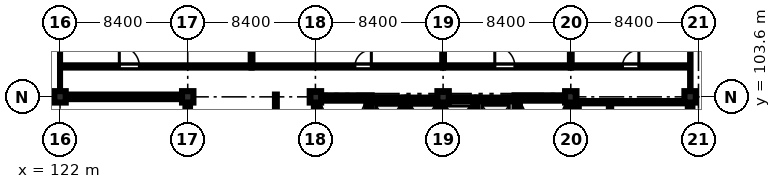
"""IFC4 building model, lengths in metres.
Left out: names, types, materials, properties, quantities, classifications, styles, units other than length and angle.
Written with IfcOpenShell. Run it as: python <this file> out.ifc"""

import sys

from ifc_helpers import new_model, si_unit, direction, frame, frame_2d, origin, origin_2d, place, context, subcontext, project, spatial, rectangle, extrude, element, fill, save


model = new_model("IFC4")
c1 = context("Model", 3, precision=1e-05, world=origin(), true_north=direction((0.0, 1.0)))
c2 = subcontext(c1, "Body", "Model", "MODEL_VIEW")
j1 = project(units=[si_unit("LENGTHUNIT", "METRE"), si_unit("PLANEANGLEUNIT", "RADIAN")], contexts=[c1])
p1 = place(None, origin())
s1 = spatial("IfcSite", under=j1, at=p1, CompositionType="ELEMENT")
p2 = place(p1, origin())
s2 = spatial("IfcBuilding", under=s1, at=p2, CompositionType="ELEMENT")
p3 = place(p2, frame((0.0, 0.0, 52.8)))
s3 = spatial("IfcBuildingStorey", under=s2, at=p3, CompositionType="ELEMENT", Elevation=52.8)
for number, where, z_axis, x_axis in (
    (1, (122.0, 103.6, 0.0), (0.0, 0.0, 1.0), (1.0, 0.0, 0.0)),
    (2, (130.4, 103.6, 0.0), (0.0, 0.0, 1.0), (1.0, 0.0, 0.0)),
    (3, (138.8, 103.6, 0.0), (0.0, 0.0, 1.0), (1.0, 0.0, 0.0)),
    (4, (147.2, 103.6, 0.0), (0.0, 0.0, 1.0), (1.0, 0.0, 0.0)),
    (5, (155.6, 103.6, 0.0), (0.0, 0.0, 1.0), (1.0, 0.0, 0.0)),
    (6, (163.45, 103.6, 0.0), (0.0, 0.0, 1.0), (1.0, 0.0, 0.0)),
):
    element("IfcColumn", number, at=place(p3, frame(where, z_axis=z_axis, x_axis=x_axis)), inside=s3, PredefinedType="COLUMN", context=c2, shape_type="SweptSolid", body=[
        extrude(rectangle(XDim=0.75, YDim=0.75, at=origin_2d()), origin(), (0.0, 0.0, 1.0), 4.03),
    ])
p4 = place(p3, frame((138.7, 103.525, 0.0), z_axis=(0.0, 0.0, 1.0), x_axis=(1.0, 0.0, 0.0)))
e7 = element("IfcWall", 7, at=p4, inside=s3, PredefinedType="SHEAR", context=c2, shape_type="SweptSolid", body=[
    extrude(rectangle(XDim=3.8, YDim=0.35, at=frame_2d((1.9, 0.0))), origin(), (0.0, 0.0, 1.0), 4.03),
])
p5 = place(p3, frame((138.875, 95.45, 0.0), z_axis=(0.0, 0.0, 1.0), x_axis=(0.0, 1.0, 0.0)))
e8 = element("IfcWall", 8, at=p5, inside=s3, PredefinedType="SHEAR", context=c2, shape_type="SweptSolid", body=[
    extrude(rectangle(XDim=7.9, YDim=0.35, at=frame_2d((3.95, 0.0))), origin(), (0.0, 0.0, 1.0), 4.03),
])
p6 = place(p3, frame((142.325, 95.45, 0.0), z_axis=(0.0, 0.0, 1.0), x_axis=(0.0, 1.0, 0.0)))
e9 = element("IfcWall", 9, at=p6, inside=s3, PredefinedType="SHEAR", context=c2, shape_type="SweptSolid", body=[
    extrude(rectangle(XDim=7.9, YDim=0.35, at=frame_2d((3.95, 0.0))), origin(), (0.0, 0.0, 1.0), 4.03),
])
p7 = place(p6, frame((0.22, 0.0, 0.0)))
e10 = element("IfcOpeningElement", 10, at=p7, cuts=e9, PredefinedType="OPENING", context=c2, shape_type="SweptSolid", body=[
    extrude(rectangle(XDim=1.15, YDim=2.15, at=frame_2d((0.575, 1.075))), frame((0.0, 0.185, 0.0), z_axis=(0.0, -1.0, 0.0), x_axis=(1.0, 0.0, 0.0)), (0.0, 0.0, 1.0), 0.37),
])
p8 = place(p3, frame((151.9, 103.525, 0.0), z_axis=(0.0, 0.0, 1.0), x_axis=(1.0, 0.0, 0.0)))
e11 = element("IfcWall", 11, at=p8, inside=s3, PredefinedType="SHEAR", context=c2, shape_type="SweptSolid", body=[
    extrude(rectangle(XDim=3.8, YDim=0.35, at=frame_2d((1.9, 0.0))), origin(), (0.0, 0.0, 1.0), 4.03),
])
p9 = place(p3, frame((152.075, 95.45, 0.0), z_axis=(0.0, 0.0, 1.0), x_axis=(0.0, 1.0, 0.0)))
e12 = element("IfcWall", 12, at=p9, inside=s3, PredefinedType="SHEAR", context=c2, shape_type="SweptSolid", body=[
    extrude(rectangle(XDim=7.9, YDim=0.35, at=frame_2d((3.95, 0.0))), origin(), (0.0, 0.0, 1.0), 4.03),
])
p10 = place(p9, frame((0.35, 0.0, 0.0)))
e13 = element("IfcOpeningElement", 13, at=p10, cuts=e12, PredefinedType="OPENING", context=c2, shape_type="SweptSolid", body=[
    extrude(rectangle(XDim=1.15, YDim=2.15, at=frame_2d((0.575, 1.075))), frame((0.0, 0.185, 0.0), z_axis=(0.0, -1.0, 0.0), x_axis=(1.0, 0.0, 0.0)), (0.0, 0.0, 1.0), 0.37),
])
p11 = place(p3, frame((155.525, 95.45, 0.0), z_axis=(0.0, 0.0, 1.0), x_axis=(0.0, 1.0, 0.0)))
e14 = element("IfcWall", 14, at=p11, inside=s3, PredefinedType="SHEAR", context=c2, shape_type="SweptSolid", body=[
    extrude(rectangle(XDim=7.9, YDim=0.35, at=frame_2d((3.95, 0.0))), origin(), (0.0, 0.0, 1.0), 4.03),
])
p12 = place(p3, frame((142.5, 103.425, 0.0), z_axis=(0.0, 0.0, 1.0), x_axis=(1.0, 0.0, 0.0)))
e15 = element("IfcWall", 15, at=p12, inside=s3, PredefinedType="SHEAR", context=c2, shape_type="SweptSolid", body=[
    extrude(rectangle(XDim=2.1, YDim=0.25, at=frame_2d((1.05, 0.0))), origin(), (0.0, 0.0, 1.0), 4.03),
])
p13 = place(p3, frame((144.725, 100.15, 0.0), z_axis=(0.0, 0.0, 1.0), x_axis=(0.0, 1.0, 0.0)))
e16 = element("IfcWall", 16, at=p13, inside=s3, PredefinedType="SHEAR", context=c2, shape_type="SweptSolid", body=[
    extrude(rectangle(XDim=3.4, YDim=0.25, at=frame_2d((1.7, 0.0))), origin(), (0.0, 0.0, 1.0), 4.03),
])
p14 = place(p3, frame((144.85, 103.425, 0.0), z_axis=(0.0, 0.0, 1.0), x_axis=(1.0, 0.0, 0.0)))
e17 = element("IfcWall", 17, at=p14, inside=s3, PredefinedType="SHEAR", context=c2, shape_type="SweptSolid", body=[
    extrude(rectangle(XDim=2.05, YDim=0.25, at=frame_2d((1.025, 0.0))), origin(), (0.0, 0.0, 1.0), 4.03),
])
p15 = place(p3, frame((147.025, 100.15, 0.0), z_axis=(0.0, 0.0, 1.0), x_axis=(0.0, 1.0, 0.0)))
e18 = element("IfcWall", 18, at=p15, inside=s3, PredefinedType="SHEAR", context=c2, shape_type="SweptSolid", body=[
    extrude(rectangle(XDim=3.4, YDim=0.25, at=frame_2d((1.7, 0.0))), origin(), (0.0, 0.0, 1.0), 4.03),
])
p16 = place(p3, frame((147.15, 103.425, 0.0), z_axis=(0.0, 0.0, 1.0), x_axis=(1.0, 0.0, 0.0)))
e19 = element("IfcWall", 19, at=p16, inside=s3, PredefinedType="SHEAR", context=c2, shape_type="SweptSolid", body=[
    extrude(rectangle(XDim=2.05, YDim=0.25, at=frame_2d((1.025, 0.0))), origin(), (0.0, 0.0, 1.0), 4.03),
])
p17 = place(p3, frame((149.325, 100.35, 0.0), z_axis=(0.0, 0.0, 1.0), x_axis=(0.0, 1.0, 0.0)))
e20 = element("IfcWall", 20, at=p17, inside=s3, PredefinedType="SHEAR", context=c2, shape_type="SweptSolid", body=[
    extrude(rectangle(XDim=3.2, YDim=0.25, at=frame_2d((1.6, 0.0))), origin(), (0.0, 0.0, 1.0), 4.03),
])
p18 = place(p3, frame((149.45, 103.425, 0.0), z_axis=(0.0, 0.0, 1.0), x_axis=(1.0, 0.0, 0.0)))
e21 = element("IfcWall", 21, at=p18, inside=s3, PredefinedType="SHEAR", context=c2, shape_type="SweptSolid", body=[
    extrude(rectangle(XDim=2.45, YDim=0.25, at=frame_2d((1.225, 0.0))), origin(), (0.0, 0.0, 1.0), 4.03),
])
p19 = place(p3, frame((163.45, 103.225, 0.0), z_axis=(0.0, 0.0, 1.0), x_axis=(0.0, -1.0, 0.0)))
e22 = element("IfcWall", 22, at=p19, inside=s3, PredefinedType="STANDARD", context=c2, shape_type="SweptSolid", body=[
    extrude(rectangle(XDim=7.65, YDim=0.3, at=frame_2d((3.825, 0.0))), origin(), (0.0, 0.0, 1.0), 3.33),
])
p20 = place(p19, frame((1.15, 0.0, 1.1)))
e23 = element("IfcOpeningElement", 23, at=p20, cuts=e22, PredefinedType="OPENING", context=c2, shape_type="SweptSolid", body=[
    extrude(rectangle(XDim=1.4, YDim=1.4, at=frame_2d((0.7, 0.7))), frame((0.0, 0.16, 0.0), z_axis=(0.0, -1.0, 0.0), x_axis=(1.0, 0.0, 0.0)), (0.0, 0.0, 1.0), 0.32),
])
p21 = place(p3, frame((130.4, 95.575, 0.0), z_axis=(0.0, 0.0, 1.0), x_axis=(0.0, 1.0, 0.0)))
e24 = element("IfcWall", 24, at=p21, inside=s3, PredefinedType="STANDARD", context=c2, shape_type="SweptSolid", body=[
    extrude(rectangle(XDim=7.65, YDim=0.3, at=frame_2d((3.825, 0.0))), origin(), (0.0, 0.0, 1.0), 3.33),
])
p22 = place(p21, frame((2.4, 0.0, 1.0)))
e25 = element("IfcOpeningElement", 25, at=p22, cuts=e24, PredefinedType="OPENING", context=c2, shape_type="SweptSolid", body=[
    extrude(rectangle(XDim=1.8, YDim=1.8, at=frame_2d((0.9, 0.9))), frame((0.0, 0.16, 0.0), z_axis=(0.0, -1.0, 0.0), x_axis=(1.0, 0.0, 0.0)), (0.0, 0.0, 1.0), 0.32),
])
p23 = place(p3, frame((130.025, 103.6, 0.0), z_axis=(0.0, 0.0, 1.0), x_axis=(-1.0, 0.0, 0.0)))
e26 = element("IfcWall", 26, at=p23, inside=s3, PredefinedType="STANDARD", context=c2, shape_type="SweptSolid", body=[
    extrude(rectangle(XDim=7.65, YDim=0.3, at=frame_2d((3.825, 0.0))), origin(), (0.0, 0.0, 1.0), 3.33),
])
p24 = place(p3, frame((158.18, 94.68, 0.0), z_axis=(0.0, 0.0, 1.0), x_axis=(0.0, 1.0, 0.0)))
e27 = element("IfcWall", 27, at=p24, inside=s3, PredefinedType="PARTITIONING", context=c2, shape_type="SweptSolid", body=[
    extrude(rectangle(XDim=8.57, YDim=0.15, at=frame_2d((4.285, 0.0))), origin(), (0.0, 0.0, 1.0), 4.03),
])
p25 = place(p24, frame((0.8, 0.0, 0.0)))
e28 = element("IfcOpeningElement", 28, at=p25, cuts=e27, PredefinedType="OPENING", context=c2, shape_type="SweptSolid", body=[
    extrude(rectangle(XDim=1.0, YDim=2.12, at=frame_2d((0.5, 1.06))), frame((0.0, 0.085, 0.0), z_axis=(0.0, -1.0, 0.0), x_axis=(1.0, 0.0, 0.0)), (0.0, 0.0, 1.0), 0.17),
])
p26 = place(p24, frame((3.5, 0.0, 0.0)))
e29 = element("IfcOpeningElement", 29, at=p26, cuts=e27, PredefinedType="OPENING", context=c2, shape_type="SweptSolid", body=[
    extrude(rectangle(XDim=0.92, YDim=2.1, at=frame_2d((0.46, 1.05))), frame((0.0, 0.085, 0.0), z_axis=(0.0, -1.0, 0.0), x_axis=(1.0, 0.0, 0.0)), (0.0, 0.0, 1.0), 0.17),
])
p27 = place(p24, frame((6.4, 0.0, 0.0)))
e30 = element("IfcOpeningElement", 30, at=p27, cuts=e27, PredefinedType="OPENING", context=c2, shape_type="SweptSolid", body=[
    extrude(rectangle(XDim=0.92, YDim=2.1, at=frame_2d((0.46, 1.05))), frame((0.0, 0.085, 0.0), z_axis=(0.0, -1.0, 0.0), x_axis=(1.0, 0.0, 0.0)), (0.0, 0.0, 1.0), 0.17),
])
p28 = place(p3, frame((156.05, 103.25, 0.0), z_axis=(0.0, 0.0, 1.0), x_axis=(1.0, 0.0, 0.0)))
e31 = element("IfcWall", 31, at=p28, inside=s3, PredefinedType="PARTITIONING", context=c2, shape_type="SweptSolid", body=[
    extrude(rectangle(XDim=7.15, YDim=0.15, at=frame_2d((3.575, 0.0))), origin(), (0.0, 0.0, 1.0), 4.03),
])
p29 = place(p3, frame((156.05, 94.68, 0.0), z_axis=(0.0, 0.0, 1.0), x_axis=(0.0, 1.0, 0.0)))
e32 = element("IfcWall", 32, at=p29, inside=s3, PredefinedType="PARTITIONING", context=c2, shape_type="SweptSolid", body=[
    extrude(rectangle(XDim=8.57, YDim=0.15, at=frame_2d((4.285, 0.0))), origin(), (0.0, 0.0, 1.0), 4.03),
])
p30 = place(p3, frame((136.2, 94.68, 0.0), z_axis=(0.0, 0.0, 1.0), x_axis=(0.0, 1.0, 0.0)))
e33 = element("IfcWall", 33, at=p30, inside=s3, PredefinedType="PARTITIONING", context=c2, shape_type="SweptSolid", body=[
    extrude(rectangle(XDim=9.07, YDim=0.12, at=frame_2d((4.535, 0.0))), origin(), (0.0, 0.0, 1.0), 4.03),
])
p31 = place(p3, frame((122.15, 105.6, 0.0), z_axis=(0.0, 0.0, 1.0), x_axis=(1.0, 0.0, 0.0)))
e34 = element("IfcWall", 34, at=p31, inside=s3, PredefinedType="PARTITIONING", context=c2, shape_type="SweptSolid", body=[
    extrude(rectangle(XDim=12.45, YDim=0.145, at=frame_2d((6.225, 0.0))), origin(), (0.0, 0.0, 1.0), 4.03),
])
p32 = place(p31, frame((3.75, 0.0, 0.0)))
e35 = element("IfcOpeningElement", 35, at=p32, cuts=e34, PredefinedType="OPENING", context=c2, shape_type="SweptSolid", body=[
    extrude(rectangle(XDim=1.32, YDim=2.2, at=frame_2d((0.66, 1.1))), frame((0.0, 0.083, 0.0), z_axis=(0.0, -1.0, 0.0), x_axis=(1.0, 0.0, 0.0)), (0.0, 0.0, 1.0), 0.165),
])
p33 = place(p3, frame((134.6, 105.6, 0.0), z_axis=(0.0, 0.0, 1.0), x_axis=(1.0, 0.0, 0.0)))
e36 = element("IfcWall", 36, at=p33, inside=s3, PredefinedType="PARTITIONING", context=c2, shape_type="SweptSolid", body=[
    extrude(rectangle(XDim=12.6, YDim=0.145, at=frame_2d((6.3, 0.0))), origin(), (0.0, 0.0, 1.0), 4.03),
])
p34 = place(p33, frame((6.8, 0.0, 0.0)))
e37 = element("IfcOpeningElement", 37, at=p34, cuts=e36, PredefinedType="OPENING", context=c2, shape_type="SweptSolid", body=[
    extrude(rectangle(XDim=1.08, YDim=2.15, at=frame_2d((0.54, 1.075))), frame((0.0, 0.083, 0.0), z_axis=(0.0, -1.0, 0.0), x_axis=(1.0, 0.0, 0.0)), (0.0, 0.0, 1.0), 0.165),
])
p35 = place(p3, frame((134.6, 105.6, 0.0), z_axis=(0.0, 0.0, 1.0), x_axis=(0.0, 1.0, 0.0)))
e38 = element("IfcWall", 38, at=p35, inside=s3, PredefinedType="PARTITIONING", context=c2, shape_type="SweptSolid", body=[
    extrude(rectangle(XDim=5.75, YDim=0.112, at=frame_2d((2.875, 0.0))), origin(), (0.0, 0.0, 1.0), 3.58),
])
p36 = place(p3, frame((147.2, 105.6, 0.0), z_axis=(0.0, 0.0, 1.0), x_axis=(1.0, 0.0, 0.0)))
e39 = element("IfcWall", 39, at=p36, inside=s3, PredefinedType="PARTITIONING", context=c2, shape_type="SweptSolid", body=[
    extrude(rectangle(XDim=8.4, YDim=0.145, at=frame_2d((4.2, 0.0))), origin(), (0.0, 0.0, 1.0), 4.03),
])
p37 = place(p36, frame((3.4, 0.0, 0.0)))
e40 = element("IfcOpeningElement", 40, at=p37, cuts=e39, PredefinedType="OPENING", context=c2, shape_type="SweptSolid", body=[
    extrude(rectangle(XDim=1.32, YDim=2.2, at=frame_2d((0.66, 1.1))), frame((0.0, 0.083, 0.0), z_axis=(0.0, -1.0, 0.0), x_axis=(1.0, 0.0, 0.0)), (0.0, 0.0, 1.0), 0.165),
])
p38 = place(p3, frame((147.2, 105.6, 0.0), z_axis=(0.0, 0.0, 1.0), x_axis=(0.0, 1.0, 0.0)))
e41 = element("IfcWall", 41, at=p38, inside=s3, PredefinedType="PARTITIONING", context=c2, shape_type="SweptSolid", body=[
    extrude(rectangle(XDim=5.75, YDim=0.112, at=frame_2d((2.875, 0.0))), origin(), (0.0, 0.0, 1.0), 3.33),
])
p39 = place(p3, frame((155.6, 105.6, 0.0), z_axis=(0.0, 0.0, 1.0), x_axis=(1.0, 0.0, 0.0)))
e42 = element("IfcWall", 42, at=p39, inside=s3, PredefinedType="PARTITIONING", context=c2, shape_type="SweptSolid", body=[
    extrude(rectangle(XDim=7.75, YDim=0.145, at=frame_2d((3.875, 0.0))), origin(), (0.0, 0.0, 1.0), 4.03),
])
p40 = place(p39, frame((3.4, 0.0, 0.0)))
e43 = element("IfcOpeningElement", 43, at=p40, cuts=e42, PredefinedType="OPENING", context=c2, shape_type="SweptSolid", body=[
    extrude(rectangle(XDim=1.08, YDim=2.15, at=frame_2d((0.54, 1.075))), frame((0.0, 0.083, 0.0), z_axis=(0.0, -1.0, 0.0), x_axis=(1.0, 0.0, 0.0)), (0.0, 0.0, 1.0), 0.165),
])
p41 = place(p3, frame((155.6, 105.6, 0.0), z_axis=(0.0, 0.0, 1.0), x_axis=(0.0, 1.0, 0.0)))
e44 = element("IfcWall", 44, at=p41, inside=s3, PredefinedType="PARTITIONING", context=c2, shape_type="SweptSolid", body=[
    extrude(rectangle(XDim=5.75, YDim=0.112, at=frame_2d((2.875, 0.0))), origin(), (0.0, 0.0, 1.0), 3.33),
])
p42 = place(p32, origin())
e45 = element("IfcDoor", 45, at=p42, inside=s3, OperationType="SINGLE_SWING_LEFT", PredefinedType="DOOR", context=c2, shape_type="SweptSolid", body=[
    extrude(rectangle(XDim=1.32, YDim=2.2, at=frame_2d((0.66, 1.1))), frame((0.0, 0.025, 0.0), z_axis=(0.0, -1.0, 0.0), x_axis=(1.0, 0.0, 0.0)), (0.0, 0.0, 1.0), 0.05),
])
fill(e35, e45)
p43 = place(p34, origin())
e46 = element("IfcDoor", 46, at=p43, inside=s3, OperationType="SINGLE_SWING_RIGHT", PredefinedType="DOOR", context=c2, shape_type="SweptSolid", body=[
    extrude(rectangle(XDim=1.08, YDim=2.15, at=frame_2d((0.54, 1.075))), frame((0.0, 0.025, 0.0), z_axis=(0.0, -1.0, 0.0), x_axis=(1.0, 0.0, 0.0)), (0.0, 0.0, 1.0), 0.05),
])
fill(e37, e46)
p44 = place(p37, origin())
e47 = element("IfcDoor", 47, at=p44, inside=s3, OperationType="SINGLE_SWING_LEFT", PredefinedType="DOOR", context=c2, shape_type="SweptSolid", body=[
    extrude(rectangle(XDim=1.32, YDim=2.2, at=frame_2d((0.66, 1.1))), frame((0.0, 0.025, 0.0), z_axis=(0.0, -1.0, 0.0), x_axis=(1.0, 0.0, 0.0)), (0.0, 0.0, 1.0), 0.05),
])
fill(e40, e47)
p45 = place(p40, origin())
e48 = element("IfcDoor", 48, at=p45, inside=s3, OperationType="SINGLE_SWING_RIGHT", PredefinedType="DOOR", context=c2, shape_type="SweptSolid", body=[
    extrude(rectangle(XDim=1.08, YDim=2.15, at=frame_2d((0.54, 1.075))), frame((0.0, 0.025, 0.0), z_axis=(0.0, -1.0, 0.0), x_axis=(1.0, 0.0, 0.0)), (0.0, 0.0, 1.0), 0.05),
])
fill(e43, e48)
save(model, sys.argv[1])
